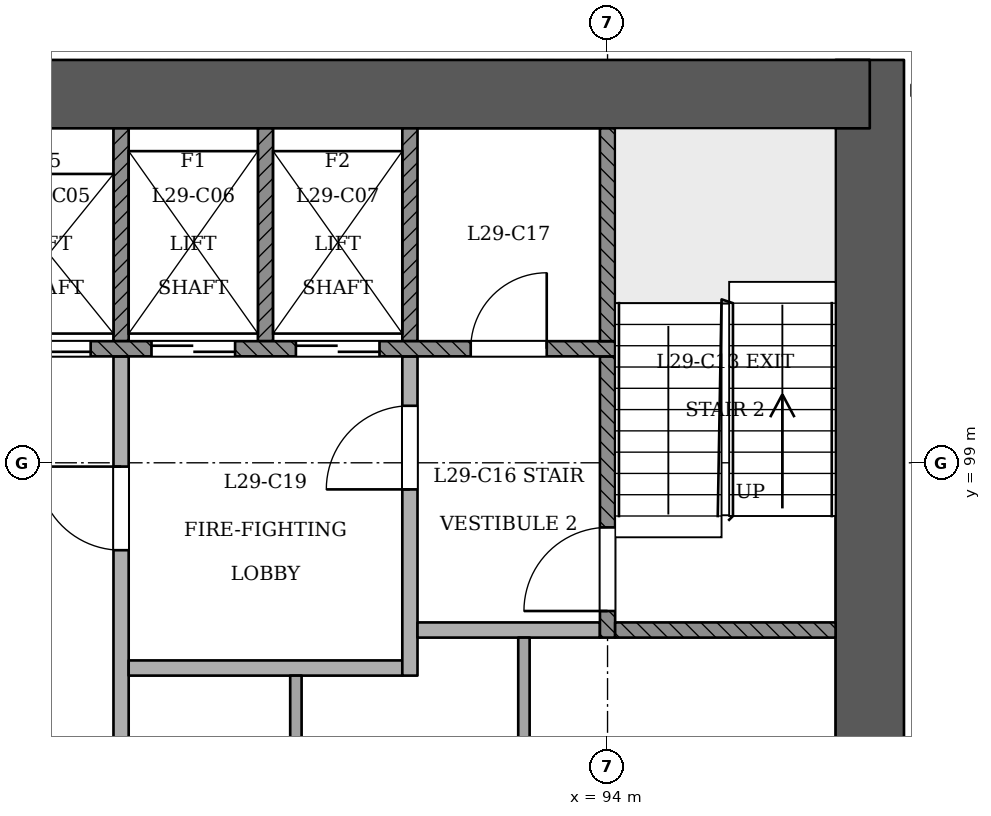
"""IFC4 building model, lengths in metres.
Left out: names, types, materials, properties, quantities, classifications, styles, units other than length and angle.
Written with IfcOpenShell. Run it as: python <this file> out.ifc"""

import sys

from ifc_helpers import new_model, si_unit, direction, frame, frame_2d, origin, place, context, subcontext, project, spatial, rectangle, extrude, element, fill, save


model = new_model("IFC4")
c1 = context("Model", 3, precision=1e-05, world=origin(), true_north=direction((0.0, 1.0)))
c2 = subcontext(c1, "Body", "Model", "MODEL_VIEW")
j1 = project(units=[si_unit("LENGTHUNIT", "METRE"), si_unit("PLANEANGLEUNIT", "RADIAN")], contexts=[c1])
p1 = place(None, origin())
s1 = spatial("IfcSite", under=j1, at=p1, CompositionType="ELEMENT")
p2 = place(p1, origin())
s2 = spatial("IfcBuilding", under=s1, at=p2, CompositionType="ELEMENT")
p3 = place(p2, frame((0.0, 0.0, 115.2)))
s3 = spatial("IfcBuildingStorey", under=s2, at=p3, CompositionType="ELEMENT", Elevation=115.2)
p4 = place(p3, frame((97.45, 92.95, 0.0), z_axis=(0.0, 0.0, 1.0), x_axis=(0.0, 1.0, 0.0)))
e1 = element("IfcWall", 1, at=p4, inside=s3, PredefinedType="SHEAR", context=c2, shape_type="SweptSolid", body=[
    extrude(rectangle(XDim=11.35, YDim=0.9, at=frame_2d((5.675, 0.0))), origin(), (0.0, 0.0, 1.0), 3.6),
])
p5 = place(p3, frame((97.45, 103.85, 0.0), z_axis=(0.0, 0.0, 1.0), x_axis=(-1.0, 0.0, 0.0)))
e2 = element("IfcWall", 2, at=p5, inside=s3, PredefinedType="SHEAR", context=c2, shape_type="SweptSolid", body=[
    extrude(rectangle(XDim=25.35, YDim=0.9, at=frame_2d((12.675, 0.0))), origin(), (0.0, 0.0, 1.0), 3.6),
])
p6 = place(p3, frame((85.304, 62.316, 0.0), z_axis=(0.0, 0.0, 1.0), x_axis=(0.499997402089, 0.866026903684, 0.0)))
e3 = element("IfcWall", 3, at=p6, inside=s3, PredefinedType="PARTITIONING", context=c2, shape_type="SweptSolid", body=[
    extrude(rectangle(XDim=41.173, YDim=0.15, at=frame_2d((20.586, 0.0))), origin(), (0.0, 0.0, 1.0), 2.75),
])
p7 = place(p6, frame((0.248, 0.0, 0.0)))
e4 = element("IfcOpeningElement", 4, at=p7, cuts=e3, PredefinedType="OPENING", context=c2, shape_type="SweptSolid", body=[
    extrude(rectangle(XDim=1.2, YDim=2.1, at=frame_2d((0.6, 1.05))), frame((0.0, 0.085, 0.0), z_axis=(0.0, -1.0, 0.0), x_axis=(1.0, 0.0, 0.0)), (0.0, 0.0, 1.0), 0.171),
])
p8 = place(p6, frame((8.737, 0.0, 0.0)))
e5 = element("IfcOpeningElement", 5, at=p8, cuts=e3, PredefinedType="OPENING", context=c2, shape_type="SweptSolid", body=[
    extrude(rectangle(XDim=1.2, YDim=2.1, at=frame_2d((0.6, 1.05))), frame((0.0, 0.085, 0.0), z_axis=(0.0, -1.0, 0.0), x_axis=(1.0, 0.0, 0.0)), (0.0, 0.0, 1.0), 0.171),
])
p9 = place(p6, frame((22.237, 0.0, 0.0)))
e6 = element("IfcOpeningElement", 6, at=p9, cuts=e3, PredefinedType="OPENING", context=c2, shape_type="SweptSolid", body=[
    extrude(rectangle(XDim=1.2, YDim=2.1, at=frame_2d((0.6, 1.05))), frame((0.0, 0.085, 0.0), z_axis=(0.0, -1.0, 0.0), x_axis=(1.0, 0.0, 0.0)), (0.0, 0.0, 1.0), 0.171),
])
p10 = place(p6, frame((32.387, 0.0, 0.0)))
e7 = element("IfcOpeningElement", 7, at=p10, cuts=e3, PredefinedType="OPENING", context=c2, shape_type="SweptSolid", body=[
    extrude(rectangle(XDim=1.2, YDim=2.1, at=frame_2d((0.6, 1.05))), frame((0.0, 0.085, 0.0), z_axis=(0.0, -1.0, 0.0), x_axis=(1.0, 0.0, 0.0)), (0.0, 0.0, 1.0), 0.171),
])
p11 = place(p6, frame((39.725, 0.0, 0.0)))
e8 = element("IfcOpeningElement", 8, at=p11, cuts=e3, PredefinedType="OPENING", context=c2, shape_type="SweptSolid", body=[
    extrude(rectangle(XDim=1.2, YDim=2.1, at=frame_2d((0.6, 1.05))), frame((0.0, 0.085, 0.0), z_axis=(0.0, -1.0, 0.0), x_axis=(1.0, 0.0, 0.0)), (0.0, 0.0, 1.0), 0.171),
])
p12 = place(p3, frame((87.6, 93.4, 0.0), z_axis=(0.0, 0.0, 1.0), x_axis=(0.0, 1.0, 0.0)))
e9 = element("IfcWall", 9, at=p12, inside=s3, PredefinedType="PARTITIONING", context=c2, shape_type="SweptSolid", body=[
    extrude(rectangle(XDim=7.0, YDim=0.2, at=frame_2d((3.5, 0.0))), origin(), (0.0, 0.0, 1.0), 3.15),
])
p13 = place(p12, frame((4.45, 0.0, 0.0)))
e10 = element("IfcOpeningElement", 10, at=p13, cuts=e9, PredefinedType="OPENING", context=c2, shape_type="SweptSolid", body=[
    extrude(rectangle(XDim=1.1, YDim=2.1, at=frame_2d((0.55, 1.05))), frame((0.0, 0.11, 0.0), z_axis=(0.0, -1.0, 0.0), x_axis=(1.0, 0.0, 0.0)), (0.0, 0.0, 1.0), 0.221),
])
p14 = place(p3, frame((89.9, 93.4, 0.0), z_axis=(0.0, 0.0, 1.0), x_axis=(0.0, 1.0, 0.0)))
e11 = element("IfcWall", 11, at=p14, inside=s3, PredefinedType="PARTITIONING", context=c2, shape_type="SweptSolid", body=[
    extrude(rectangle(XDim=2.8, YDim=0.15, at=frame_2d((1.4, 0.0))), origin(), (0.0, 0.0, 1.0), 3.15),
])
p15 = place(p3, frame((92.9, 93.4, 0.0), z_axis=(0.0, 0.0, 1.0), x_axis=(0.0, 1.0, 0.0)))
e12 = element("IfcWall", 12, at=p15, inside=s3, PredefinedType="PARTITIONING", context=c2, shape_type="SweptSolid", body=[
    extrude(rectangle(XDim=3.3, YDim=0.15, at=frame_2d((1.65, 0.0))), origin(), (0.0, 0.0, 1.0), 3.15),
])
p16 = place(p3, frame((87.7, 96.3, 0.0), z_axis=(0.0, 0.0, 1.0), x_axis=(1.0, 0.0, 0.0)))
e13 = element("IfcWall", 13, at=p16, inside=s3, PredefinedType="PARTITIONING", context=c2, shape_type="SweptSolid", body=[
    extrude(rectangle(XDim=3.6, YDim=0.2, at=frame_2d((1.8, 0.0))), origin(), (0.0, 0.0, 1.0), 3.15),
])
p17 = place(p3, frame((91.4, 96.2, 0.0), z_axis=(0.0, 0.0, 1.0), x_axis=(0.0, 1.0, 0.0)))
e14 = element("IfcWall", 14, at=p17, inside=s3, PredefinedType="PARTITIONING", context=c2, shape_type="SweptSolid", body=[
    extrude(rectangle(XDim=4.2, YDim=0.2, at=frame_2d((2.1, 0.0))), origin(), (0.0, 0.0, 1.0), 3.15),
])
p18 = place(p17, frame((2.45, 0.0, 0.0)))
e15 = element("IfcOpeningElement", 15, at=p18, cuts=e14, PredefinedType="OPENING", context=c2, shape_type="SweptSolid", body=[
    extrude(rectangle(XDim=1.1, YDim=2.1, at=frame_2d((0.55, 1.05))), frame((0.0, 0.11, 0.0), z_axis=(0.0, -1.0, 0.0), x_axis=(1.0, 0.0, 0.0)), (0.0, 0.0, 1.0), 0.221),
])
p19 = place(p3, frame((91.5, 96.8, 0.0), z_axis=(0.0, 0.0, 1.0), x_axis=(1.0, 0.0, 0.0)))
e16 = element("IfcWall", 16, at=p19, inside=s3, PredefinedType="PARTITIONING", context=c2, shape_type="SweptSolid", body=[
    extrude(rectangle(XDim=2.4, YDim=0.2, at=frame_2d((1.2, 0.0))), origin(), (0.0, 0.0, 1.0), 3.15),
])
p20 = place(p3, frame((94.0, 96.7, 0.0), z_axis=(0.0, 0.0, 1.0), x_axis=(0.0, 1.0, 0.0)))
e17 = element("IfcWall", 17, at=p20, inside=s3, PredefinedType="SOLIDWALL", context=c2, shape_type="SweptSolid", body=[
    extrude(rectangle(XDim=3.7, YDim=0.2, at=frame_2d((1.85, 0.0))), origin(), (0.0, 0.0, 1.0), 3.15),
])
p21 = place(p20, frame((0.35, 0.0, 0.0)))
e18 = element("IfcOpeningElement", 18, at=p21, cuts=e17, PredefinedType="OPENING", context=c2, shape_type="SweptSolid", body=[
    extrude(rectangle(XDim=1.1, YDim=2.1, at=frame_2d((0.55, 1.05))), frame((0.0, 0.11, 0.0), z_axis=(0.0, -1.0, 0.0), x_axis=(1.0, 0.0, 0.0)), (0.0, 0.0, 1.0), 0.221),
])
p22 = place(p3, frame((94.1, 96.8, 0.0), z_axis=(0.0, 0.0, 1.0), x_axis=(1.0, 0.0, 0.0)))
e19 = element("IfcWall", 19, at=p22, inside=s3, PredefinedType="SOLIDWALL", context=c2, shape_type="SweptSolid", body=[
    extrude(rectangle(XDim=2.9, YDim=0.2, at=frame_2d((1.45, 0.0))), origin(), (0.0, 0.0, 1.0), 3.15),
])
p23 = place(p3, frame((75.9, 100.5, 0.0), z_axis=(0.0, 0.0, 1.0), x_axis=(1.0, 0.0, 0.0)))
e20 = element("IfcWall", 20, at=p23, inside=s3, PredefinedType="SOLIDWALL", context=c2, shape_type="SweptSolid", body=[
    extrude(rectangle(XDim=18.2, YDim=0.2, at=frame_2d((9.1, 0.0))), origin(), (0.0, 0.0, 1.0), 3.15),
])
p24 = place(p23, frame((2.6, 0.0, 0.0)))
e21 = element("IfcOpeningElement", 21, at=p24, cuts=e20, PredefinedType="OPENING", context=c2, shape_type="SweptSolid", body=[
    extrude(rectangle(XDim=1.1, YDim=2.1, at=frame_2d((0.55, 1.05))), frame((0.0, 0.11, 0.0), z_axis=(0.0, -1.0, 0.0), x_axis=(1.0, 0.0, 0.0)), (0.0, 0.0, 1.0), 0.221),
])
p25 = place(p23, frame((4.5, 0.0, 0.0)))
e22 = element("IfcOpeningElement", 22, at=p25, cuts=e20, PredefinedType="OPENING", context=c2, shape_type="SweptSolid", body=[
    extrude(rectangle(XDim=1.1, YDim=2.1, at=frame_2d((0.55, 1.05))), frame((0.0, 0.11, 0.0), z_axis=(0.0, -1.0, 0.0), x_axis=(1.0, 0.0, 0.0)), (0.0, 0.0, 1.0), 0.221),
])
p26 = place(p23, frame((6.4, 0.0, 0.0)))
e23 = element("IfcOpeningElement", 23, at=p26, cuts=e20, PredefinedType="OPENING", context=c2, shape_type="SweptSolid", body=[
    extrude(rectangle(XDim=1.1, YDim=2.1, at=frame_2d((0.55, 1.05))), frame((0.0, 0.11, 0.0), z_axis=(0.0, -1.0, 0.0), x_axis=(1.0, 0.0, 0.0)), (0.0, 0.0, 1.0), 0.221),
])
p27 = place(p23, frame((8.3, 0.0, 0.0)))
e24 = element("IfcOpeningElement", 24, at=p27, cuts=e20, PredefinedType="OPENING", context=c2, shape_type="SweptSolid", body=[
    extrude(rectangle(XDim=1.1, YDim=2.1, at=frame_2d((0.55, 1.05))), frame((0.0, 0.11, 0.0), z_axis=(0.0, -1.0, 0.0), x_axis=(1.0, 0.0, 0.0)), (0.0, 0.0, 1.0), 0.221),
])
p28 = place(p23, frame((10.2, 0.0, 0.0)))
e25 = element("IfcOpeningElement", 25, at=p28, cuts=e20, PredefinedType="OPENING", context=c2, shape_type="SweptSolid", body=[
    extrude(rectangle(XDim=1.1, YDim=2.1, at=frame_2d((0.55, 1.05))), frame((0.0, 0.11, 0.0), z_axis=(0.0, -1.0, 0.0), x_axis=(1.0, 0.0, 0.0)), (0.0, 0.0, 1.0), 0.221),
])
p29 = place(p23, frame((12.1, 0.0, 0.0)))
e26 = element("IfcOpeningElement", 26, at=p29, cuts=e20, PredefinedType="OPENING", context=c2, shape_type="SweptSolid", body=[
    extrude(rectangle(XDim=1.1, YDim=2.1, at=frame_2d((0.55, 1.05))), frame((0.0, 0.11, 0.0), z_axis=(0.0, -1.0, 0.0), x_axis=(1.0, 0.0, 0.0)), (0.0, 0.0, 1.0), 0.221),
])
p30 = place(p23, frame((14.0, 0.0, 0.0)))
e27 = element("IfcOpeningElement", 27, at=p30, cuts=e20, PredefinedType="OPENING", context=c2, shape_type="SweptSolid", body=[
    extrude(rectangle(XDim=1.1, YDim=2.1, at=frame_2d((0.55, 1.05))), frame((0.0, 0.11, 0.0), z_axis=(0.0, -1.0, 0.0), x_axis=(1.0, 0.0, 0.0)), (0.0, 0.0, 1.0), 0.221),
])
p31 = place(p23, frame((0.65, 0.0, 0.0)))
e28 = element("IfcOpeningElement", 28, at=p31, cuts=e20, PredefinedType="OPENING", context=c2, shape_type="SweptSolid", body=[
    extrude(rectangle(XDim=1.0, YDim=2.1, at=frame_2d((0.5, 1.05))), frame((0.0, 0.11, 0.0), z_axis=(0.0, -1.0, 0.0), x_axis=(1.0, 0.0, 0.0)), (0.0, 0.0, 1.0), 0.221),
])
p32 = place(p23, frame((16.3, 0.0, 0.0)))
e29 = element("IfcOpeningElement", 29, at=p32, cuts=e20, PredefinedType="OPENING", context=c2, shape_type="SweptSolid", body=[
    extrude(rectangle(XDim=1.0, YDim=2.1, at=frame_2d((0.5, 1.05))), frame((0.0, 0.11, 0.0), z_axis=(0.0, -1.0, 0.0), x_axis=(1.0, 0.0, 0.0)), (0.0, 0.0, 1.0), 0.221),
])
for number, where, z_axis, x_axis in (
    (30, (87.6, 100.6, 0.0), (0.0, 0.0, 1.0), (0.0, 1.0, 0.0)),
    (31, (89.5, 100.6, 0.0), (0.0, 0.0, 1.0), (0.0, 1.0, 0.0)),
    (32, (91.4, 100.6, 0.0), (0.0, 0.0, 1.0), (0.0, 1.0, 0.0)),
    (33, (94.0, 100.6, 0.0), (0.0, 0.0, 1.0), (0.0, 1.0, 0.0)),
):
    element("IfcWall", number, at=place(p3, frame(where, z_axis=z_axis, x_axis=x_axis)), inside=s3, PredefinedType="SOLIDWALL", context=c2, shape_type="SweptSolid", body=[
        extrude(rectangle(XDim=2.8, YDim=0.2, at=frame_2d((1.4, 0.0))), origin(), (0.0, 0.0, 1.0), 3.15),
    ])
p33 = place(p28, origin())
e34 = element("IfcDoor", 34, at=p33, inside=s3, OperationType="SLIDING_TO_RIGHT", PredefinedType="NOTDEFINED", context=c2, shape_type="SweptSolid", body=[
    extrude(rectangle(XDim=1.1, YDim=2.1, at=frame_2d((0.55, 1.05))), frame((0.0, 0.025, 0.0), z_axis=(0.0, -1.0, 0.0), x_axis=(1.0, 0.0, 0.0)), (0.0, 0.0, 1.0), 0.05),
])
fill(e25, e34)
p34 = place(p29, origin())
e35 = element("IfcDoor", 35, at=p34, inside=s3, OperationType="SLIDING_TO_RIGHT", PredefinedType="NOTDEFINED", context=c2, shape_type="SweptSolid", body=[
    extrude(rectangle(XDim=1.1, YDim=2.1, at=frame_2d((0.55, 1.05))), frame((0.0, 0.025, 0.0), z_axis=(0.0, -1.0, 0.0), x_axis=(1.0, 0.0, 0.0)), (0.0, 0.0, 1.0), 0.05),
])
fill(e26, e35)
p35 = place(p30, origin())
e36 = element("IfcDoor", 36, at=p35, inside=s3, OperationType="SLIDING_TO_LEFT", PredefinedType="NOTDEFINED", context=c2, shape_type="SweptSolid", body=[
    extrude(rectangle(XDim=1.1, YDim=2.1, at=frame_2d((0.55, 1.05))), frame((0.0, 0.025, 0.0), z_axis=(0.0, -1.0, 0.0), x_axis=(1.0, 0.0, 0.0)), (0.0, 0.0, 1.0), 0.05),
])
fill(e27, e36)
p36 = place(p21, origin())
e37 = element("IfcDoor", 37, at=p36, inside=s3, OperationType="SINGLE_SWING_LEFT", PredefinedType="NOTDEFINED", context=c2, shape_type="SweptSolid", body=[
    extrude(rectangle(XDim=1.1, YDim=2.1, at=frame_2d((0.55, 1.05))), frame((0.0, 0.025, 0.0), z_axis=(0.0, -1.0, 0.0), x_axis=(1.0, 0.0, 0.0)), (0.0, 0.0, 1.0), 0.05),
])
fill(e18, e37)
p37 = place(p13, origin())
e38 = element("IfcDoor", 38, at=p37, inside=s3, OperationType="SINGLE_SWING_RIGHT", PredefinedType="NOTDEFINED", context=c2, shape_type="SweptSolid", body=[
    extrude(rectangle(XDim=1.1, YDim=2.1, at=frame_2d((0.55, 1.05))), frame((0.0, 0.025, 0.0), z_axis=(0.0, -1.0, 0.0), x_axis=(1.0, 0.0, 0.0)), (0.0, 0.0, 1.0), 0.05),
])
fill(e10, e38)
p38 = place(p18, origin())
e39 = element("IfcDoor", 39, at=p38, inside=s3, OperationType="SINGLE_SWING_LEFT", PredefinedType="NOTDEFINED", context=c2, shape_type="SweptSolid", body=[
    extrude(rectangle(XDim=1.1, YDim=2.1, at=frame_2d((0.55, 1.05))), frame((0.0, 0.025, 0.0), z_axis=(0.0, -1.0, 0.0), x_axis=(1.0, 0.0, 0.0)), (0.0, 0.0, 1.0), 0.05),
])
fill(e15, e39)
p39 = place(p32, origin())
e40 = element("IfcDoor", 40, at=p39, inside=s3, OperationType="SINGLE_SWING_RIGHT", PredefinedType="NOTDEFINED", context=c2, shape_type="SweptSolid", body=[
    extrude(rectangle(XDim=1.0, YDim=2.1, at=frame_2d((0.5, 1.05))), frame((0.0, 0.025, 0.0), z_axis=(0.0, -1.0, 0.0), x_axis=(1.0, 0.0, 0.0)), (0.0, 0.0, 1.0), 0.05),
])
fill(e29, e40)
save(model, sys.argv[1])
